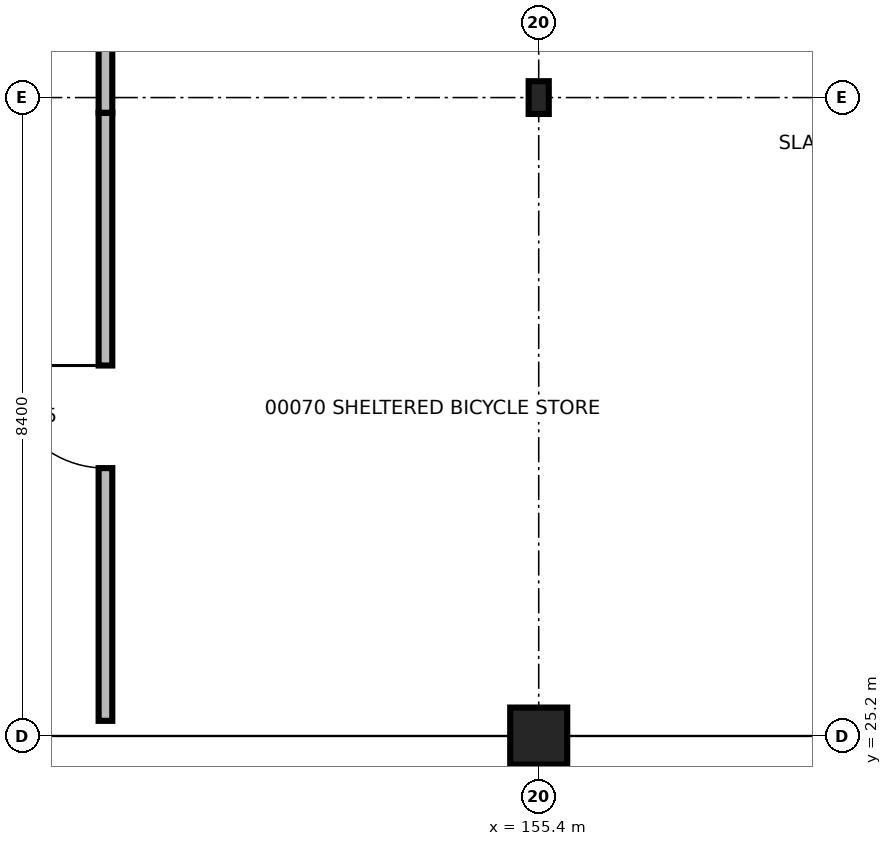
"""IFC4 building model, lengths in metres.
Left out: names, types, materials, properties, quantities, classifications, styles, units other than length and angle.
Written with IfcOpenShell. Run it as: python <this file> out.ifc"""

import sys

from ifc_helpers import new_model, si_unit, direction, frame, frame_2d, origin, origin_2d, place, context, subcontext, project, spatial, rectangle, i_section, extrude, element, fill, save


model = new_model("IFC4")
c1 = context("Model", 3, precision=1e-05, world=origin(), true_north=direction((0.0, 1.0)))
c2 = subcontext(c1, "Body", "Model", "MODEL_VIEW")
j1 = project(units=[si_unit("LENGTHUNIT", "METRE"), si_unit("PLANEANGLEUNIT", "RADIAN")], contexts=[c1])
p1 = place(None, origin())
s1 = spatial("IfcSite", under=j1, at=p1, CompositionType="ELEMENT")
p2 = place(p1, origin())
s2 = spatial("IfcBuilding", under=s1, at=p2, CompositionType="ELEMENT")
p3 = place(p2, origin())
s3 = spatial("IfcBuildingStorey", under=s2, at=p3, CompositionType="ELEMENT", Elevation=0.0)
p4 = place(p3, frame((155.4, 25.2, 0.0), z_axis=(0.0, 0.0, 1.0), x_axis=(1.0, 0.0, 0.0)))
e1 = element("IfcColumn", 1, at=p4, inside=s3, PredefinedType="COLUMN", context=c2, shape_type="SweptSolid", body=[
    extrude(rectangle(XDim=0.75, YDim=0.75, at=origin_2d()), origin(), (0.0, 0.0, 1.0), 5.1),
])
p5 = place(p3, frame((155.4, 33.6, 0.0), z_axis=(0.0, 0.0, 1.0), x_axis=(1.0, 0.0, 0.0)))
e2 = element("IfcColumn", 2, at=p5, inside=s3, PredefinedType="COLUMN", context=c2, shape_type="SweptSolid", body=[
    extrude(i_section(OverallWidth=0.265, OverallDepth=0.431, WebThickness=0.015, FlangeThickness=0.025, at=origin_2d()), origin(), (0.0, 0.0, 1.0), 5.1),
])
p6 = place(p3, frame((149.7, 25.4, 0.0), z_axis=(0.0, 0.0, 1.0), x_axis=(0.0, 1.0, 0.0)))
e3 = element("IfcWall", 3, at=p6, inside=s3, PredefinedType="PARTITIONING", context=c2, shape_type="SweptSolid", body=[
    extrude(rectangle(XDim=8.0, YDim=0.18, at=frame_2d((4.0, 0.0))), origin(), (0.0, 0.0, 1.0), 4.72),
])
p7 = place(p6, frame((3.325, 0.0, 0.0)))
e4 = element("IfcOpeningElement", 4, at=p7, cuts=e3, PredefinedType="OPENING", context=c2, shape_type="SweptSolid", body=[
    extrude(rectangle(XDim=1.35, YDim=2.2, at=frame_2d((0.675, 1.1))), frame((0.0, 0.1, 0.0), z_axis=(0.0, -1.0, 0.0), x_axis=(1.0, 0.0, 0.0)), (0.0, 0.0, 1.0), 0.2),
])
p8 = place(p3, frame((149.7, 33.4, 0.0), z_axis=(0.0, 0.0, 1.0), x_axis=(0.0, 1.0, 0.0)))
e5 = element("IfcWall", 5, at=p8, inside=s3, PredefinedType="PARTITIONING", context=c2, shape_type="SweptSolid", body=[
    extrude(rectangle(XDim=8.2, YDim=0.18, at=frame_2d((4.1, 0.0))), origin(), (0.0, 0.0, 1.0), 4.183),
])
p9 = place(p8, frame((3.56, 0.0, 0.0)))
e6 = element("IfcOpeningElement", 6, at=p9, cuts=e5, PredefinedType="OPENING", context=c2, shape_type="SweptSolid", body=[
    extrude(rectangle(XDim=1.08, YDim=2.2, at=frame_2d((0.54, 1.1))), frame((0.0, 0.1, 0.0), z_axis=(0.0, -1.0, 0.0), x_axis=(1.0, 0.0, 0.0)), (0.0, 0.0, 1.0), 0.2),
])
p10 = place(p7, frame((1.35, 0.0, 0.0), z_axis=(0.0, 0.0, 1.0), x_axis=(-1.0, 0.0, 0.0)))
e7 = element("IfcDoor", 7, at=p10, inside=s3, OperationType="SINGLE_SWING_LEFT", PredefinedType="DOOR", context=c2, shape_type="SweptSolid", body=[
    extrude(rectangle(XDim=1.35, YDim=2.2, at=frame_2d((0.675, 1.1))), frame((0.0, 0.025, 0.0), z_axis=(0.0, -1.0, 0.0), x_axis=(1.0, 0.0, 0.0)), (0.0, 0.0, 1.0), 0.05),
])
fill(e4, e7)
save(model, sys.argv[1])
